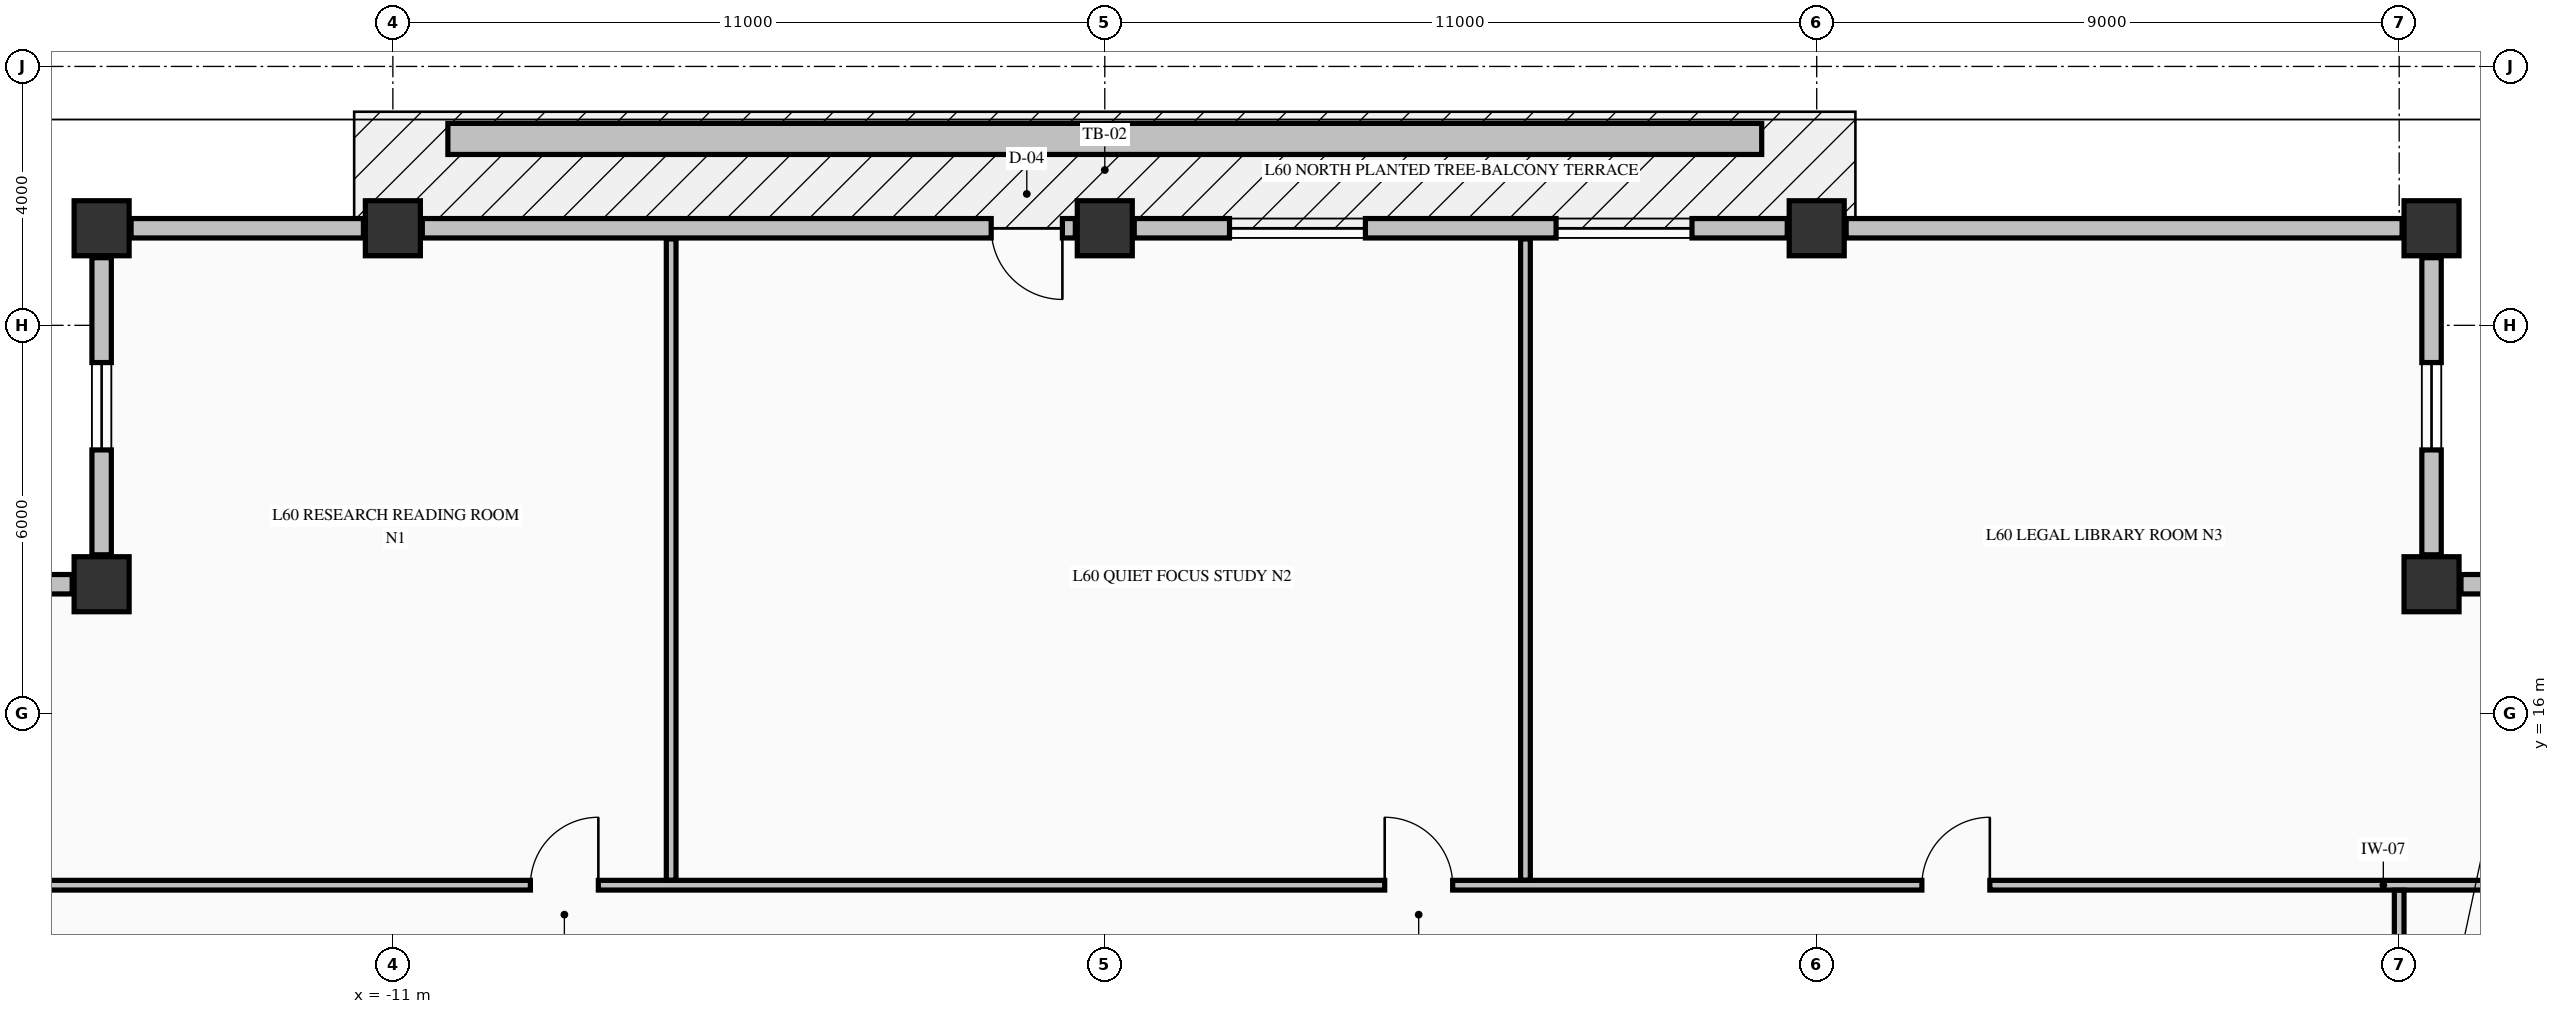
"""IFC4 building model, lengths in metres.
Left out: names, types, materials, properties, quantities, classifications, styles, units other than length and angle.
Written with IfcOpenShell. Run it as: python <this file> out.ifc"""

import sys

from ifc_helpers import new_model, si_unit, direction, frame, frame_2d, origin, origin_2d, place, context, subcontext, project, spatial, rectangle, extrude, element, fill, save


model = new_model("IFC4")
c1 = context("Model", 3, precision=1e-05, world=origin(), true_north=direction((0.0, 1.0)))
c2 = subcontext(c1, "Body", "Model", "MODEL_VIEW")
j1 = project(units=[si_unit("LENGTHUNIT", "METRE"), si_unit("PLANEANGLEUNIT", "RADIAN")], contexts=[c1])
p1 = place(None, origin())
s1 = spatial("IfcSite", under=j1, at=p1, CompositionType="ELEMENT")
p2 = place(p1, origin())
s2 = spatial("IfcBuilding", under=s1, at=p2, CompositionType="ELEMENT")
p3 = place(p2, frame((0.0, 0.0, 230.05)))
s3 = spatial("IfcBuildingStorey", under=s2, at=p3, CompositionType="ELEMENT", Elevation=230.05)
for number, where, z_axis, x_axis in (
    (1, (-15.5, 23.5, -0.25), (0.0, 0.0, 1.0), (1.0, 0.0, 0.0)),
    (2, (-11.0, 23.5, -0.25), (0.0, 0.0, 1.0), (1.0, 0.0, 0.0)),
    (3, (0.0, 23.5, -0.25), (0.0, 0.0, 1.0), (1.0, 0.0, 0.0)),
    (4, (11.0, 23.5, -0.25), (0.0, 0.0, 1.0), (1.0, 0.0, 0.0)),
    (5, (20.5, 23.5, -0.25), (0.0, 0.0, 1.0), (1.0, 0.0, 0.0)),
    (6, (20.5, 18.0, -0.25), (0.0, 0.0, 1.0), (1.0, 0.0, 0.0)),
    (7, (-15.5, 18.0, -0.25), (0.0, 0.0, 1.0), (1.0, 0.0, 0.0)),
):
    element("IfcColumn", number, at=place(p3, frame(where, z_axis=z_axis, x_axis=x_axis)), inside=s3, PredefinedType="COLUMN", context=c2, shape_type="SweptSolid", body=[
        extrude(rectangle(XDim=0.85, YDim=0.85, at=origin_2d()), origin(), (0.0, 0.0, 1.0), 3.23),
    ])
p4 = place(p3, frame((25.545, 18.0, 0.0), z_axis=(0.0, 0.0, 1.0), x_axis=(-1.0, 0.0, 0.0)))
e8 = element("IfcWall", 8, at=p4, inside=s3, PredefinedType="STANDARD", context=c2, shape_type="SweptSolid", body=[
    extrude(rectangle(XDim=4.59, YDim=0.3, at=frame_2d((2.295, 0.0))), origin(), (0.0, 0.0, 1.0), 2.372),
])
p5 = place(p4, frame((1.62, 0.0, 0.68)))
e9 = element("IfcOpeningElement", 9, at=p5, cuts=e8, PredefinedType="OPENING", context=c2, shape_type="SweptSolid", body=[
    extrude(rectangle(XDim=1.35, YDim=1.42, at=frame_2d((0.675, 0.71))), frame((0.0, 0.16, 0.0), z_axis=(0.0, -1.0, 0.0), x_axis=(1.0, 0.0, 0.0)), (0.0, 0.0, 1.0), 0.32),
])
p6 = place(p3, frame((20.5, 18.455, 0.0), z_axis=(0.0, 0.0, 1.0), x_axis=(0.0, 1.0, 0.0)))
e10 = element("IfcWall", 10, at=p6, inside=s3, PredefinedType="STANDARD", context=c2, shape_type="SweptSolid", body=[
    extrude(rectangle(XDim=4.59, YDim=0.3, at=frame_2d((2.295, 0.0))), origin(), (0.0, 0.0, 1.0), 2.372),
])
p7 = place(p6, frame((1.62, 0.0, 0.68)))
e11 = element("IfcOpeningElement", 11, at=p7, cuts=e10, PredefinedType="OPENING", context=c2, shape_type="SweptSolid", body=[
    extrude(rectangle(XDim=1.35, YDim=1.42, at=frame_2d((0.675, 0.71))), frame((0.0, 0.16, 0.0), z_axis=(0.0, -1.0, 0.0), x_axis=(1.0, 0.0, 0.0)), (0.0, 0.0, 1.0), 0.32),
])
p8 = place(p3, frame((-15.5, 23.045, 0.0), z_axis=(0.0, 0.0, 1.0), x_axis=(0.0, -1.0, 0.0)))
e12 = element("IfcWall", 12, at=p8, inside=s3, PredefinedType="STANDARD", context=c2, shape_type="SweptSolid", body=[
    extrude(rectangle(XDim=4.59, YDim=0.3, at=frame_2d((2.295, 0.0))), origin(), (0.0, 0.0, 1.0), 2.372),
])
p9 = place(p8, frame((1.62, 0.0, 0.68)))
e13 = element("IfcOpeningElement", 13, at=p9, cuts=e12, PredefinedType="OPENING", context=c2, shape_type="SweptSolid", body=[
    extrude(rectangle(XDim=1.35, YDim=1.42, at=frame_2d((0.675, 0.71))), frame((0.0, 0.16, 0.0), z_axis=(0.0, -1.0, 0.0), x_axis=(1.0, 0.0, 0.0)), (0.0, 0.0, 1.0), 0.32),
])
p10 = place(p3, frame((-15.955, 18.0, 0.0), z_axis=(0.0, 0.0, 1.0), x_axis=(-1.0, 0.0, 0.0)))
e14 = element("IfcWall", 14, at=p10, inside=s3, PredefinedType="STANDARD", context=c2, shape_type="SweptSolid", body=[
    extrude(rectangle(XDim=4.59, YDim=0.3, at=frame_2d((2.295, 0.0))), origin(), (0.0, 0.0, 1.0), 2.372),
])
p11 = place(p10, frame((1.62, 0.0, 0.68)))
e15 = element("IfcOpeningElement", 15, at=p11, cuts=e14, PredefinedType="OPENING", context=c2, shape_type="SweptSolid", body=[
    extrude(rectangle(XDim=1.35, YDim=1.42, at=frame_2d((0.675, 0.71))), frame((0.0, 0.16, 0.0), z_axis=(0.0, -1.0, 0.0), x_axis=(1.0, 0.0, 0.0)), (0.0, 0.0, 1.0), 0.32),
])
p12 = place(p3, frame((-11.455, 23.5, 0.0), z_axis=(0.0, 0.0, 1.0), x_axis=(-1.0, 0.0, 0.0)))
e16 = element("IfcWall", 16, at=p12, inside=s3, PredefinedType="STANDARD", context=c2, shape_type="SweptSolid", body=[
    extrude(rectangle(XDim=3.59, YDim=0.3, at=frame_2d((1.795, 0.0))), origin(), (0.0, 0.0, 1.0), 2.372),
])
p13 = place(p3, frame((-0.455, 23.5, 0.0), z_axis=(0.0, 0.0, 1.0), x_axis=(-1.0, 0.0, 0.0)))
e17 = element("IfcWall", 17, at=p13, inside=s3, PredefinedType="STANDARD", context=c2, shape_type="SweptSolid", body=[
    extrude(rectangle(XDim=10.09, YDim=0.3, at=frame_2d((5.045, 0.0))), origin(), (0.0, 0.0, 1.0), 2.372),
])
p14 = place(p13, frame((0.2, 0.0, 0.0)))
e18 = element("IfcOpeningElement", 18, at=p14, cuts=e17, PredefinedType="OPENING", context=c2, shape_type="SweptSolid", body=[
    extrude(rectangle(XDim=1.1, YDim=2.15, at=frame_2d((0.55, 1.075))), frame((0.0, 0.16, 0.0), z_axis=(0.0, -1.0, 0.0), x_axis=(1.0, 0.0, 0.0)), (0.0, 0.0, 1.0), 0.32),
])
p15 = place(p3, frame((10.545, 23.5, 0.0), z_axis=(0.0, 0.0, 1.0), x_axis=(-1.0, 0.0, 0.0)))
e19 = element("IfcWall", 19, at=p15, inside=s3, PredefinedType="STANDARD", context=c2, shape_type="SweptSolid", body=[
    extrude(rectangle(XDim=10.09, YDim=0.3, at=frame_2d((5.045, 0.0))), origin(), (0.0, 0.0, 1.0), 2.372),
])
p16 = place(p15, frame((1.472, 0.0, 0.7)))
e20 = element("IfcOpeningElement", 20, at=p16, cuts=e19, PredefinedType="OPENING", context=c2, shape_type="SweptSolid", body=[
    extrude(rectangle(XDim=2.1, YDim=1.5, at=frame_2d((1.05, 0.75))), frame((0.0, 0.16, 0.0), z_axis=(0.0, -1.0, 0.0), x_axis=(1.0, 0.0, 0.0)), (0.0, 0.0, 1.0), 0.32),
])
p17 = place(p15, frame((6.518, 0.0, 0.7)))
e21 = element("IfcOpeningElement", 21, at=p17, cuts=e19, PredefinedType="OPENING", context=c2, shape_type="SweptSolid", body=[
    extrude(rectangle(XDim=2.1, YDim=1.5, at=frame_2d((1.05, 0.75))), frame((0.0, 0.16, 0.0), z_axis=(0.0, -1.0, 0.0), x_axis=(1.0, 0.0, 0.0)), (0.0, 0.0, 1.0), 0.32),
])
p18 = place(p3, frame((20.045, 23.5, 0.0), z_axis=(0.0, 0.0, 1.0), x_axis=(-1.0, 0.0, 0.0)))
e22 = element("IfcWall", 22, at=p18, inside=s3, PredefinedType="STANDARD", context=c2, shape_type="SweptSolid", body=[
    extrude(rectangle(XDim=8.59, YDim=0.3, at=frame_2d((4.295, 0.0))), origin(), (0.0, 0.0, 1.0), 2.372),
])
p19 = place(p3, frame((-20.075, 13.35, 0.0), z_axis=(0.0, 0.0, 1.0), x_axis=(1.0, 0.0, 0.0)))
e23 = element("IfcWall", 23, at=p19, inside=s3, PredefinedType="PARTITIONING", context=c2, shape_type="SweptSolid", body=[
    extrude(rectangle(XDim=45.91, YDim=0.15, at=frame_2d((22.955, 0.0))), origin(), (0.0, 0.0, 1.0), 2.98),
])
p20 = place(p19, frame((11.2, 0.0, 0.0)))
e24 = element("IfcOpeningElement", 24, at=p20, cuts=e23, PredefinedType="OPENING", context=c2, shape_type="SweptSolid", body=[
    extrude(rectangle(XDim=1.05, YDim=2.15, at=frame_2d((0.525, 1.075))), frame((0.0, 0.085, 0.0), z_axis=(0.0, -1.0, 0.0), x_axis=(1.0, 0.0, 0.0)), (0.0, 0.0, 1.0), 0.17),
])
p21 = place(p19, frame((24.4, 0.0, 0.0)))
e25 = element("IfcOpeningElement", 25, at=p21, cuts=e23, PredefinedType="OPENING", context=c2, shape_type="SweptSolid", body=[
    extrude(rectangle(XDim=1.05, YDim=2.15, at=frame_2d((0.525, 1.075))), frame((0.0, 0.085, 0.0), z_axis=(0.0, -1.0, 0.0), x_axis=(1.0, 0.0, 0.0)), (0.0, 0.0, 1.0), 0.17),
])
p22 = place(p19, frame((32.7, 0.0, 0.0)))
e26 = element("IfcOpeningElement", 26, at=p22, cuts=e23, PredefinedType="OPENING", context=c2, shape_type="SweptSolid", body=[
    extrude(rectangle(XDim=1.05, YDim=2.15, at=frame_2d((0.525, 1.075))), frame((0.0, 0.085, 0.0), z_axis=(0.0, -1.0, 0.0), x_axis=(1.0, 0.0, 0.0)), (0.0, 0.0, 1.0), 0.17),
])
for number, where, z_axis, x_axis in (
    (27, (-6.7, 13.428, 0.0), (0.0, 0.0, 1.0), (0.0, 1.0, 0.0)),
    (28, (6.5, 13.428, 0.0), (0.0, 0.0, 1.0), (0.0, 1.0, 0.0)),
):
    element("IfcWall", number, at=place(p3, frame(where, z_axis=z_axis, x_axis=x_axis)), inside=s3, PredefinedType="PARTITIONING", context=c2, shape_type="SweptSolid", body=[
        extrude(rectangle(XDim=9.907, YDim=0.15, at=frame_2d((4.954, 0.0))), origin(), (0.0, 0.0, 1.0), 2.98),
    ])
p23 = place(p3, frame((20.0, 10.856, 0.0), z_axis=(0.0, 0.0, 1.0), x_axis=(0.0, 1.0, 0.0)))
e29 = element("IfcWall", 29, at=p23, inside=s3, PredefinedType="PARTITIONING", context=c2, shape_type="SweptSolid", body=[
    extrude(rectangle(XDim=2.416, YDim=0.15, at=frame_2d((1.208, 0.0))), origin(), (0.0, 0.0, 1.0), 2.98),
])
p24 = place(p23, frame((0.599, 0.0, 0.0)))
e30 = element("IfcOpeningElement", 30, at=p24, cuts=e29, PredefinedType="OPENING", context=c2, shape_type="SweptSolid", body=[
    extrude(rectangle(XDim=0.95, YDim=2.15, at=frame_2d((0.475, 1.075))), frame((0.0, 0.085, 0.0), z_axis=(0.0, -1.0, 0.0), x_axis=(1.0, 0.0, 0.0)), (0.0, 0.0, 1.0), 0.17),
])
p25 = place(p3, frame((-10.15, 24.88, -0.04), z_axis=(0.0, 0.0, 1.0), x_axis=(1.0, 0.0, 0.0)))
e31 = element("IfcWall", 31, at=p25, inside=s3, PredefinedType="PARAPET", context=c2, shape_type="SweptSolid", body=[
    extrude(rectangle(XDim=20.3, YDim=0.48, at=frame_2d((10.15, 0.0))), origin(), (0.0, 0.0, 1.0), 0.52),
])
p26 = place(p7, origin())
e32 = element("IfcWindow", 32, at=p26, inside=s3, PartitioningType="SINGLE_PANEL", PredefinedType="WINDOW", context=c2, shape_type="SweptSolid", body=[
    extrude(rectangle(XDim=1.35, YDim=1.42, at=frame_2d((0.675, 0.71))), frame((0.0, 0.03, 0.0), z_axis=(0.0, -1.0, 0.0), x_axis=(1.0, 0.0, 0.0)), (0.0, 0.0, 1.0), 0.06),
])
fill(e11, e32)
p27 = place(p9, origin())
e33 = element("IfcWindow", 33, at=p27, inside=s3, PartitioningType="SINGLE_PANEL", PredefinedType="WINDOW", context=c2, shape_type="SweptSolid", body=[
    extrude(rectangle(XDim=1.35, YDim=1.42, at=frame_2d((0.675, 0.71))), frame((0.0, 0.03, 0.0), z_axis=(0.0, -1.0, 0.0), x_axis=(1.0, 0.0, 0.0)), (0.0, 0.0, 1.0), 0.06),
])
fill(e13, e33)
p28 = place(p14, origin())
e34 = element("IfcDoor", 34, at=p28, inside=s3, OperationType="SINGLE_SWING_LEFT", PredefinedType="DOOR", context=c2, shape_type="SweptSolid", body=[
    extrude(rectangle(XDim=1.1, YDim=2.15, at=frame_2d((0.55, 1.075))), frame((0.0, 0.025, 0.0), z_axis=(0.0, -1.0, 0.0), x_axis=(1.0, 0.0, 0.0)), (0.0, 0.0, 1.0), 0.05),
])
fill(e18, e34)
p29 = place(p16, origin())
e35 = element("IfcWindow", 35, at=p29, inside=s3, PartitioningType="SINGLE_PANEL", PredefinedType="WINDOW", context=c2, shape_type="SweptSolid", body=[
    extrude(rectangle(XDim=2.1, YDim=1.5, at=frame_2d((1.05, 0.75))), frame((0.0, 0.03, 0.0), z_axis=(0.0, -1.0, 0.0), x_axis=(1.0, 0.0, 0.0)), (0.0, 0.0, 1.0), 0.06),
])
fill(e20, e35)
p30 = place(p17, origin())
e36 = element("IfcWindow", 36, at=p30, inside=s3, PartitioningType="SINGLE_PANEL", PredefinedType="WINDOW", context=c2, shape_type="SweptSolid", body=[
    extrude(rectangle(XDim=2.1, YDim=1.5, at=frame_2d((1.05, 0.75))), frame((0.0, 0.03, 0.0), z_axis=(0.0, -1.0, 0.0), x_axis=(1.0, 0.0, 0.0)), (0.0, 0.0, 1.0), 0.06),
])
fill(e21, e36)
p31 = place(p20, origin())
e37 = element("IfcDoor", 37, at=p31, inside=s3, OperationType="SINGLE_SWING_RIGHT", PredefinedType="DOOR", context=c2, shape_type="SweptSolid", body=[
    extrude(rectangle(XDim=1.05, YDim=2.15, at=frame_2d((0.525, 1.075))), frame((0.0, 0.025, 0.0), z_axis=(0.0, -1.0, 0.0), x_axis=(1.0, 0.0, 0.0)), (0.0, 0.0, 1.0), 0.05),
])
fill(e24, e37)
p32 = place(p21, origin())
e38 = element("IfcDoor", 38, at=p32, inside=s3, OperationType="SINGLE_SWING_LEFT", PredefinedType="DOOR", context=c2, shape_type="SweptSolid", body=[
    extrude(rectangle(XDim=1.05, YDim=2.15, at=frame_2d((0.525, 1.075))), frame((0.0, 0.025, 0.0), z_axis=(0.0, -1.0, 0.0), x_axis=(1.0, 0.0, 0.0)), (0.0, 0.0, 1.0), 0.05),
])
fill(e25, e38)
p33 = place(p22, origin())
e39 = element("IfcDoor", 39, at=p33, inside=s3, OperationType="SINGLE_SWING_RIGHT", PredefinedType="DOOR", context=c2, shape_type="SweptSolid", body=[
    extrude(rectangle(XDim=1.05, YDim=2.15, at=frame_2d((0.525, 1.075))), frame((0.0, 0.025, 0.0), z_axis=(0.0, -1.0, 0.0), x_axis=(1.0, 0.0, 0.0)), (0.0, 0.0, 1.0), 0.05),
])
fill(e26, e39)
save(model, sys.argv[1])
